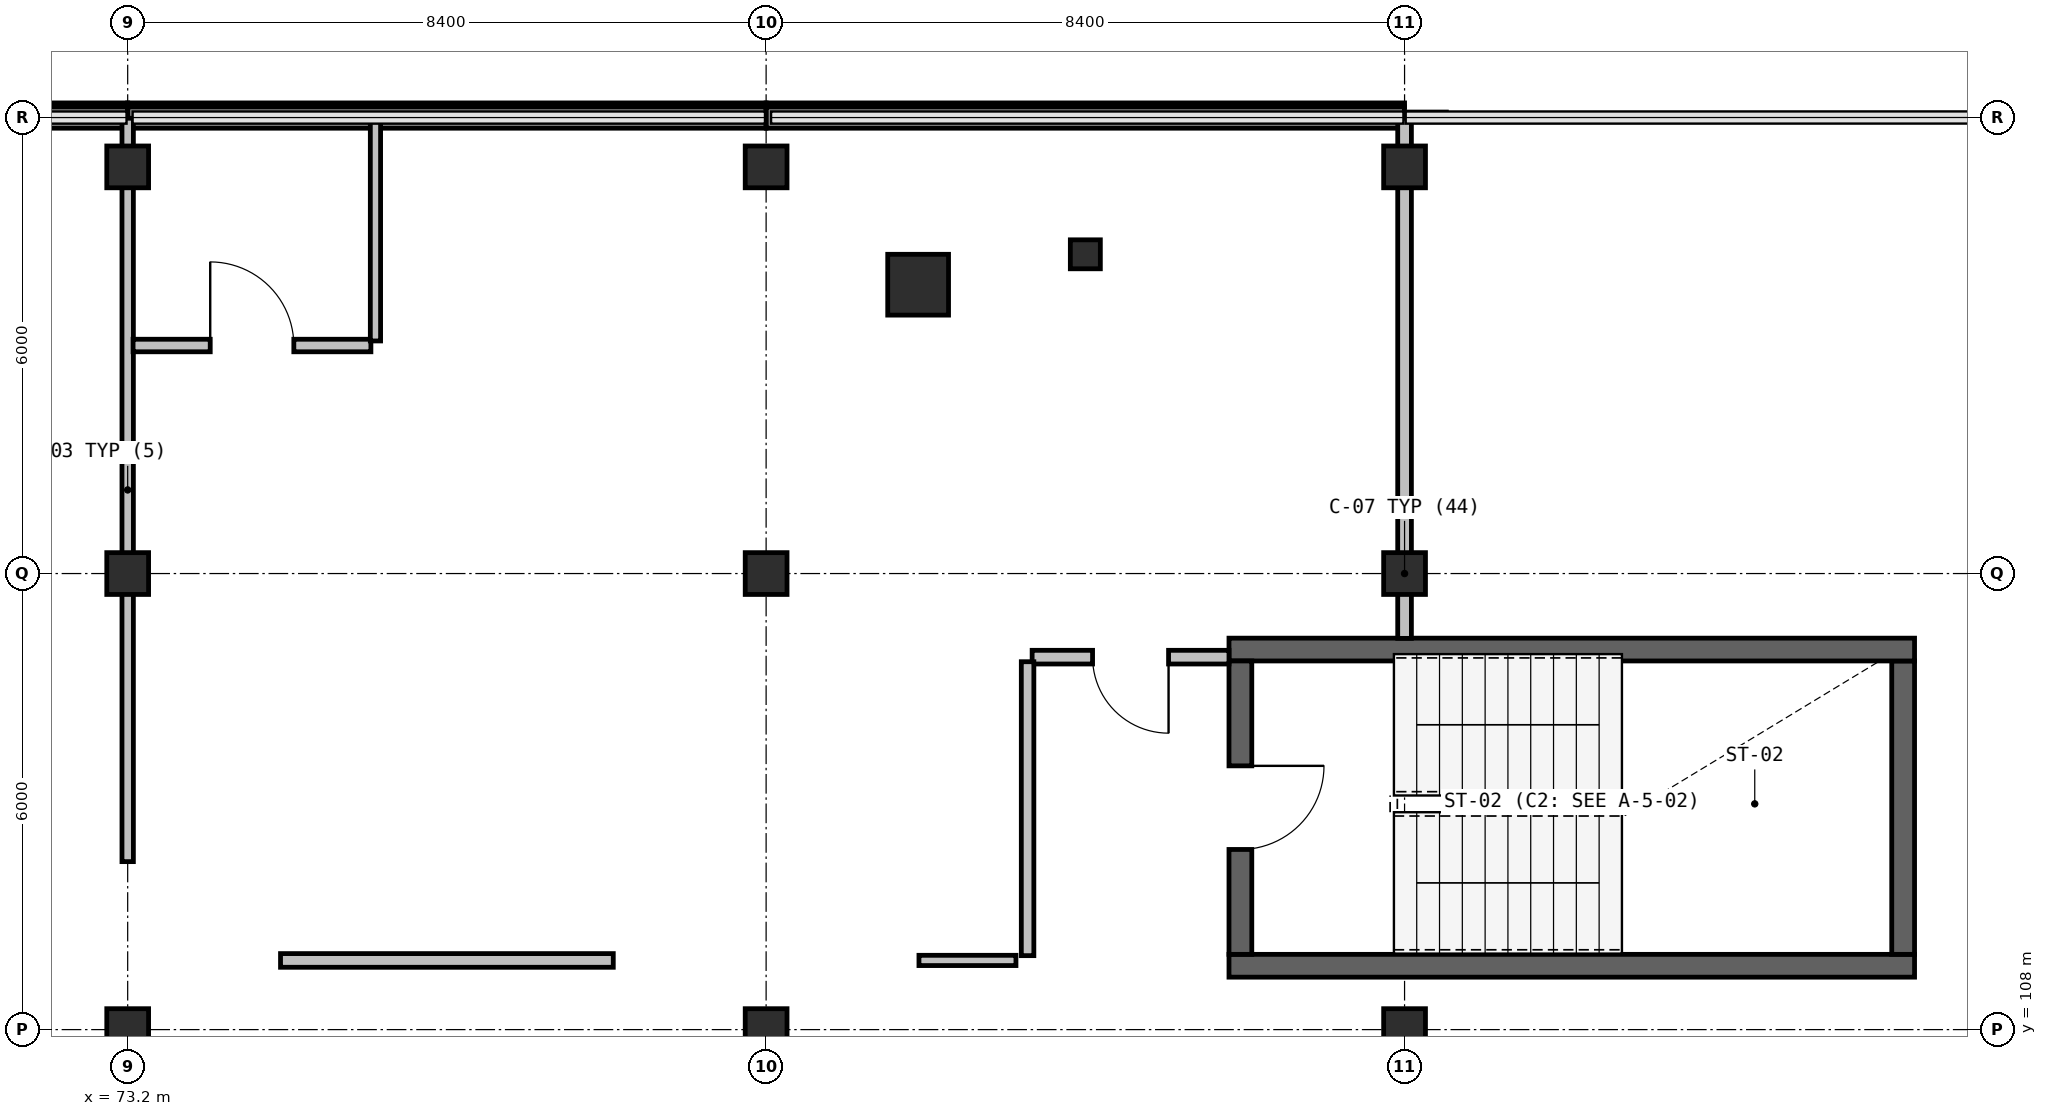
"""IFC4 building model, lengths in metres.
Left out: names, types, materials, properties, quantities, classifications, styles, units other than length and angle.
Written with IfcOpenShell. Run it as: python <this file> out.ifc"""

import sys

from ifc_helpers import new_model, si_unit, direction, frame, frame_2d, origin, origin_2d, place, context, subcontext, project, spatial, rectangle, i_section, extrude, element, fill, save


model = new_model("IFC4")
c1 = context("Model", 3, precision=1e-05, world=origin(), true_north=direction((0.0, 1.0)))
c2 = subcontext(c1, "Body", "Model", "MODEL_VIEW")
j1 = project(units=[si_unit("LENGTHUNIT", "METRE"), si_unit("PLANEANGLEUNIT", "RADIAN")], contexts=[c1])
p1 = place(None, origin())
s1 = spatial("IfcSite", under=j1, at=p1, CompositionType="ELEMENT")
p2 = place(p1, origin())
s2 = spatial("IfcBuilding", under=s1, at=p2, CompositionType="ELEMENT")
p3 = place(p2, frame((0.0, 0.0, 35.4)))
s3 = spatial("IfcBuildingStorey", under=s2, at=p3, CompositionType="ELEMENT", Elevation=35.4)
p4 = place(p3, frame((83.6, 117.8, 0.0), z_axis=(0.0, 0.0, 1.0), x_axis=(1.0, 0.0, 0.0)))
e1 = element("IfcColumn", 1, at=p4, inside=s3, PredefinedType="COLUMN", context=c2, shape_type="SweptSolid", body=[
    extrude(rectangle(XDim=0.8, YDim=0.8, at=origin_2d()), origin(), (0.0, 0.0, 1.0), 4.05),
])
p5 = place(p3, frame((85.8, 118.2, 0.0), z_axis=(0.0, 0.0, 1.0), x_axis=(1.0, 0.0, 0.0)))
e2 = element("IfcColumn", 2, at=p5, inside=s3, PredefinedType="COLUMN", context=c2, shape_type="SweptSolid", body=[
    extrude(i_section(OverallWidth=0.395, OverallDepth=0.381, WebThickness=0.018, FlangeThickness=0.03, at=origin_2d()), origin(), (0.0, 0.0, 1.0), 4.05),
])
for number, where, z_axis, x_axis in (
    (3, (73.2, 108.0, 0.0), (0.0, 0.0, 1.0), (1.0, 0.0, 0.0)),
    (4, (73.2, 114.0, 0.0), (0.0, 0.0, 1.0), (1.0, 0.0, 0.0)),
    (5, (73.2, 119.35, 0.0), (0.0, 0.0, 1.0), (1.0, 0.0, 0.0)),
    (6, (81.6, 108.0, 0.0), (0.0, 0.0, 1.0), (1.0, 0.0, 0.0)),
    (7, (81.6, 114.0, 0.0), (0.0, 0.0, 1.0), (1.0, 0.0, 0.0)),
    (8, (81.6, 119.35, 0.0), (0.0, 0.0, 1.0), (1.0, 0.0, 0.0)),
    (9, (90.0, 108.0, 0.0), (0.0, 0.0, 1.0), (1.0, 0.0, 0.0)),
    (10, (90.0, 114.0, 0.0), (0.0, 0.0, 1.0), (1.0, 0.0, 0.0)),
    (11, (90.0, 119.35, 0.0), (0.0, 0.0, 1.0), (1.0, 0.0, 0.0)),
):
    element("IfcColumn", number, at=place(p3, frame(where, z_axis=z_axis, x_axis=x_axis)), inside=s3, PredefinedType="COLUMN", context=c2, shape_type="SweptSolid", body=[
        extrude(rectangle(XDim=0.55, YDim=0.55, at=origin_2d()), origin(), (0.0, 0.0, 1.0), 3.74),
    ])
for number, where, z_axis, x_axis in (
    (12, (64.802, 119.999, 0.0), (0.0, 0.0, 1.0), (1.0, 0.0, 0.0)),
    (13, (73.202, 119.999, 0.0), (0.0, 0.0, 1.0), (1.0, 0.0, 0.0)),
    (14, (81.602, 119.999, 0.0), (0.0, 0.0, 1.0), (1.0, 0.0, 0.0)),
):
    element("IfcWall", number, at=place(p3, frame(where, z_axis=z_axis, x_axis=x_axis)), inside=s3, PredefinedType="SOLIDWALL", context=c2, shape_type="SweptSolid", body=[
        extrude(rectangle(XDim=8.396, YDim=0.28, at=frame_2d((4.198, 0.0))), origin(), (0.0, 0.0, 1.0), 0.94),
    ])
p6 = place(p3, frame((87.69, 108.84, 0.0), z_axis=(0.0, 0.0, 1.0), x_axis=(1.0, 0.0, 0.0)))
e15 = element("IfcWall", 15, at=p6, inside=s3, PredefinedType="SHEAR", context=c2, shape_type="SweptSolid", body=[
    extrude(rectangle(XDim=9.02, YDim=0.3, at=frame_2d((4.51, 0.0))), origin(), (0.0, 0.0, 1.0), 3.74),
])
p7 = place(p3, frame((96.56, 108.99, 0.0), z_axis=(0.0, 0.0, 1.0), x_axis=(0.0, 1.0, 0.0)))
e16 = element("IfcWall", 16, at=p7, inside=s3, PredefinedType="SHEAR", context=c2, shape_type="SweptSolid", body=[
    extrude(rectangle(XDim=3.86, YDim=0.3, at=frame_2d((1.93, 0.0))), origin(), (0.0, 0.0, 1.0), 3.74),
])
p8 = place(p3, frame((96.71, 113.0, 0.0), z_axis=(0.0, 0.0, 1.0), x_axis=(-1.0, 0.0, 0.0)))
e17 = element("IfcWall", 17, at=p8, inside=s3, PredefinedType="SHEAR", context=c2, shape_type="SweptSolid", body=[
    extrude(rectangle(XDim=9.02, YDim=0.3, at=frame_2d((4.51, 0.0))), origin(), (0.0, 0.0, 1.0), 3.74),
])
p9 = place(p3, frame((87.84, 112.85, 0.0), z_axis=(0.0, 0.0, 1.0), x_axis=(0.0, -1.0, 0.0)))
e18 = element("IfcWall", 18, at=p9, inside=s3, PredefinedType="SHEAR", context=c2, shape_type="SweptSolid", body=[
    extrude(rectangle(XDim=3.86, YDim=0.3, at=frame_2d((1.93, 0.0))), origin(), (0.0, 0.0, 1.0), 3.74),
])
p10 = place(p9, frame((1.38, 0.0, 0.0)))
e19 = element("IfcOpeningElement", 19, at=p10, cuts=e18, PredefinedType="OPENING", context=c2, shape_type="SweptSolid", body=[
    extrude(rectangle(XDim=1.1, YDim=2.15, at=frame_2d((0.55, 1.075))), frame((0.0, 0.16, 0.0), z_axis=(0.0, -1.0, 0.0), x_axis=(1.0, 0.0, 0.0)), (0.0, 0.0, 1.0), 0.32),
])
p11 = place(p3, frame((73.2, 119.99, 0.0), z_axis=(0.0, 0.0, 1.0), x_axis=(0.0, -1.0, 0.0)))
e20 = element("IfcWall", 20, at=p11, inside=s3, PredefinedType="PARTITIONING", context=c2, shape_type="SweptSolid", body=[
    extrude(rectangle(XDim=9.78, YDim=0.15, at=frame_2d((4.89, 0.0))), origin(), (0.0, 0.0, 1.0), 3.14),
])
p12 = place(p3, frame((87.69, 112.9, 0.0), z_axis=(0.0, 0.0, 1.0), x_axis=(-1.0, 0.0, 0.0)))
e21 = element("IfcWall", 21, at=p12, inside=s3, PredefinedType="PARTITIONING", context=c2, shape_type="SweptSolid", body=[
    extrude(rectangle(XDim=2.59, YDim=0.18, at=frame_2d((1.295, 0.0))), origin(), (0.0, 0.0, 1.0), 3.74),
])
p13 = place(p12, frame((0.795, 0.0, 0.0)))
e22 = element("IfcOpeningElement", 22, at=p13, cuts=e21, PredefinedType="OPENING", context=c2, shape_type="SweptSolid", body=[
    extrude(rectangle(XDim=1.0, YDim=2.15, at=frame_2d((0.5, 1.075))), frame((0.0, 0.1, 0.0), z_axis=(0.0, -1.0, 0.0), x_axis=(1.0, 0.0, 0.0)), (0.0, 0.0, 1.0), 0.2),
])
p14 = place(p3, frame((85.04, 112.84, 0.0), z_axis=(0.0, 0.0, 1.0), x_axis=(0.0, -1.0, 0.0)))
e23 = element("IfcWall", 23, at=p14, inside=s3, PredefinedType="PARTITIONING", context=c2, shape_type="SweptSolid", body=[
    extrude(rectangle(XDim=3.867, YDim=0.165, at=frame_2d((1.934, 0.0))), origin(), (0.0, 0.0, 1.0), 3.74),
])
p15 = place(p3, frame((84.887, 108.91, 0.0), z_axis=(0.0, 0.0, 1.0), x_axis=(-1.0, 0.0, 0.0)))
e24 = element("IfcWall", 24, at=p15, inside=s3, PredefinedType="PARTITIONING", context=c2, shape_type="SweptSolid", body=[
    extrude(rectangle(XDim=1.276, YDim=0.135, at=frame_2d((0.638, 0.0))), origin(), (0.0, 0.0, 1.0), 3.74),
])
p16 = place(p3, frame((79.589, 108.91, 0.0), z_axis=(0.0, 0.0, 1.0), x_axis=(-1.0, 0.0, 0.0)))
e25 = element("IfcWall", 25, at=p16, inside=s3, PredefinedType="PARTITIONING", context=c2, shape_type="SweptSolid", body=[
    extrude(rectangle(XDim=4.378, YDim=0.18, at=frame_2d((2.189, 0.0))), origin(), (0.0, 0.0, 1.0), 3.74),
])
p17 = place(p3, frame((73.271, 117.0, 0.0), z_axis=(0.0, 0.0, 1.0), x_axis=(1.0, 0.0, 0.0)))
e26 = element("IfcWall", 26, at=p17, inside=s3, PredefinedType="PARTITIONING", context=c2, shape_type="SweptSolid", body=[
    extrude(rectangle(XDim=3.129, YDim=0.165, at=frame_2d((1.564, 0.0))), origin(), (0.0, 0.0, 1.0), 3.74),
])
p18 = place(p17, frame((1.015, 0.0, 0.0)))
e27 = element("IfcOpeningElement", 27, at=p18, cuts=e26, PredefinedType="OPENING", context=c2, shape_type="SweptSolid", body=[
    extrude(rectangle(XDim=1.1, YDim=2.15, at=frame_2d((0.55, 1.075))), frame((0.0, 0.093, 0.0), z_axis=(0.0, -1.0, 0.0), x_axis=(1.0, 0.0, 0.0)), (0.0, 0.0, 1.0), 0.185),
])
p19 = place(p3, frame((76.46, 117.06, 0.0), z_axis=(0.0, 0.0, 1.0), x_axis=(0.0, 1.0, 0.0)))
e28 = element("IfcWall", 28, at=p19, inside=s3, PredefinedType="PARTITIONING", context=c2, shape_type="SweptSolid", body=[
    extrude(rectangle(XDim=2.897, YDim=0.135, at=frame_2d((1.448, 0.0))), origin(), (0.0, 0.0, 1.0), 3.74),
])
p20 = place(p3, frame((90.0, 119.99, 0.0), z_axis=(0.0, 0.0, 1.0), x_axis=(0.0, -1.0, 0.0)))
e29 = element("IfcWall", 29, at=p20, inside=s3, PredefinedType="PARTITIONING", context=c2, shape_type="SweptSolid", body=[
    extrude(rectangle(XDim=6.843, YDim=0.18, at=frame_2d((3.421, 0.0))), origin(), (0.0, 0.0, 1.0), 3.14),
])
p21 = place(p10, origin())
e30 = element("IfcDoor", 30, at=p21, inside=s3, OperationType="SINGLE_SWING_LEFT", PredefinedType="DOOR", context=c2, shape_type="SweptSolid", body=[
    extrude(rectangle(XDim=1.1, YDim=2.15, at=frame_2d((0.55, 1.075))), frame((0.0, 0.025, 0.0), z_axis=(0.0, -1.0, 0.0), x_axis=(1.0, 0.0, 0.0)), (0.0, 0.0, 1.0), 0.05),
])
fill(e19, e30)
p22 = place(p13, origin())
e31 = element("IfcDoor", 31, at=p22, inside=s3, OperationType="SINGLE_SWING_LEFT", PredefinedType="DOOR", context=c2, shape_type="SweptSolid", body=[
    extrude(rectangle(XDim=1.0, YDim=2.15, at=frame_2d((0.5, 1.075))), frame((0.0, 0.025, 0.0), z_axis=(0.0, -1.0, 0.0), x_axis=(1.0, 0.0, 0.0)), (0.0, 0.0, 1.0), 0.05),
])
fill(e22, e31)
p23 = place(p18, origin())
e32 = element("IfcDoor", 32, at=p23, inside=s3, OperationType="SINGLE_SWING_RIGHT", PredefinedType="DOOR", context=c2, shape_type="SweptSolid", body=[
    extrude(rectangle(XDim=1.1, YDim=2.15, at=frame_2d((0.55, 1.075))), frame((0.0, 0.025, 0.0), z_axis=(0.0, -1.0, 0.0), x_axis=(1.0, 0.0, 0.0)), (0.0, 0.0, 1.0), 0.05),
])
fill(e27, e32)
save(model, sys.argv[1])
